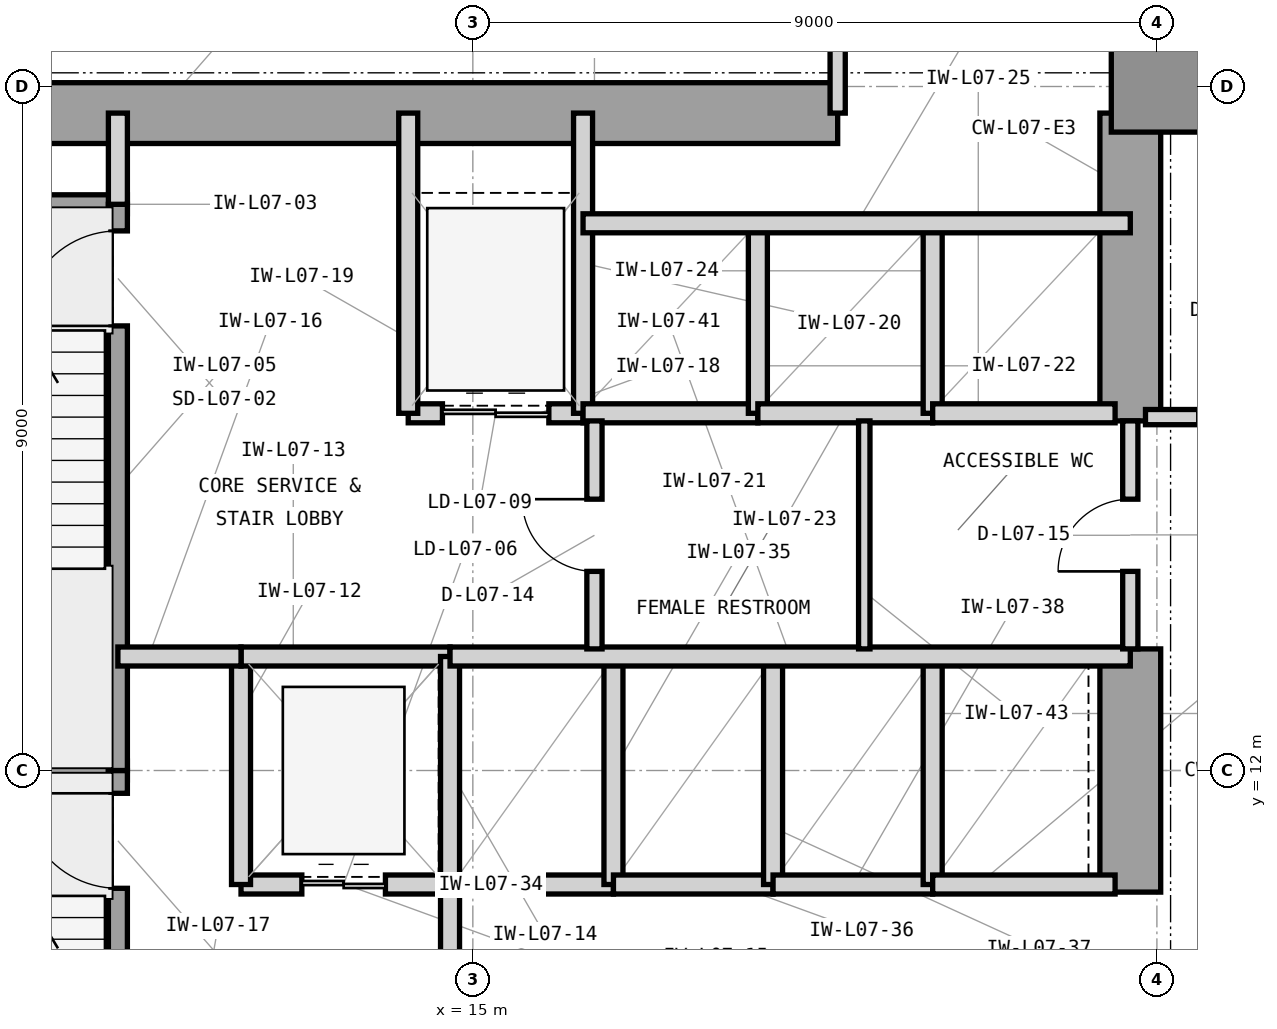
"""IFC4 building model, lengths in metres.
Left out: names, types, materials, properties, quantities, classifications, styles, units other than length and angle.
Written with IfcOpenShell. Run it as: python <this file> out.ifc"""

import sys

from ifc_helpers import new_model, si_unit, direction, frame, frame_2d, origin, origin_2d, place, context, subcontext, project, spatial, rectangle, extrude, element, fill, save


model = new_model("IFC4")
c1 = context("Model", 3, precision=1e-05, world=origin(), true_north=direction((0.0, 1.0)))
c2 = subcontext(c1, "Body", "Model", "MODEL_VIEW")
j1 = project(units=[si_unit("LENGTHUNIT", "METRE"), si_unit("PLANEANGLEUNIT", "RADIAN")], contexts=[c1])
p1 = place(None, origin())
s1 = spatial("IfcSite", under=j1, at=p1, CompositionType="ELEMENT")
p2 = place(p1, origin())
s2 = spatial("IfcBuilding", under=s1, at=p2, CompositionType="ELEMENT")
p3 = place(p2, frame((0.0, 0.0, 34.2)))
s3 = spatial("IfcBuildingStorey", under=s2, at=p3, CompositionType="ELEMENT", Elevation=34.2)
p4 = place(p3, frame((7.475, 20.65, 0.0), z_axis=(0.0, 0.0, 1.0), x_axis=(1.0, 0.0, 0.0)))
e1 = element("IfcWall", 1, at=p4, inside=s3, PredefinedType="SHEAR", context=c2, shape_type="SweptSolid", body=[
    extrude(rectangle(XDim=12.325, YDim=0.8, at=frame_2d((6.163, 0.0))), origin(), (0.0, 0.0, 1.0), 4.2),
])
p5 = place(p3, frame((23.65, 10.4, 0.0), z_axis=(0.0, 0.0, 1.0), x_axis=(0.0, 1.0, 0.0)))
e2 = element("IfcWall", 2, at=p5, inside=s3, PredefinedType="SHEAR", context=c2, shape_type="SweptSolid", body=[
    extrude(rectangle(XDim=3.2, YDim=0.8, at=frame_2d((1.6, 0.0))), origin(), (0.0, 0.0, 1.0), 4.2),
])
p6 = place(p3, frame((23.65, 16.6, 0.0), z_axis=(0.0, 0.0, 1.0), x_axis=(0.0, 1.0, 0.0)))
e3 = element("IfcWall", 3, at=p6, inside=s3, PredefinedType="SHEAR", context=c2, shape_type="SweptSolid", body=[
    extrude(rectangle(XDim=4.05, YDim=0.8, at=frame_2d((2.025, 0.0))), origin(), (0.0, 0.0, 1.0), 4.2),
])
p7 = place(p3, frame((24.0, 21.0, 0.0), z_axis=(0.0, 0.0, 1.0), x_axis=(1.0, 0.0, 0.0)))
e4 = element("IfcColumn", 4, at=p7, inside=s3, PredefinedType="COLUMN", context=c2, shape_type="SweptSolid", body=[
    extrude(rectangle(XDim=1.2, YDim=1.2, at=origin_2d()), origin(), (0.0, 0.0, 1.0), 4.2),
])
p8 = place(p3, frame((64.4, 20.79, 0.0), z_axis=(0.0, 0.0, 1.0), x_axis=(-1.0, 0.0, 0.0)))
e5 = element("IfcWall", 5, at=p8, inside=s3, PredefinedType="STANDARD", context=c2, shape_type="SweptSolid", body=[
    extrude(rectangle(XDim=40.4, YDim=0.42, at=frame_2d((20.2, 0.0))), origin(), (0.0, 0.0, 1.0), 3.98),
])
p9 = place(p8, frame((26.375, 0.0, 0.85)))
e6 = element("IfcOpeningElement", 6, at=p9, cuts=e5, PredefinedType="OPENING", context=c2, shape_type="SweptSolid", body=[
    extrude(rectangle(XDim=2.8, YDim=2.45, at=frame_2d((1.4, 1.225))), frame((0.0, 0.22, 0.0), z_axis=(0.0, -1.0, 0.0), x_axis=(1.0, 0.0, 0.0)), (0.0, 0.0, 1.0), 0.44),
])
p10 = place(p8, frame((38.222, 0.0, 0.85)))
e7 = element("IfcOpeningElement", 7, at=p10, cuts=e5, PredefinedType="OPENING", context=c2, shape_type="SweptSolid", body=[
    extrude(rectangle(XDim=1.2, YDim=2.45, at=frame_2d((0.6, 1.225))), frame((0.0, 0.22, 0.0), z_axis=(0.0, -1.0, 0.0), x_axis=(1.0, 0.0, 0.0)), (0.0, 0.0, 1.0), 0.44),
])
p11 = place(p8, frame((32.536, 0.0, 0.85)))
e8 = element("IfcOpeningElement", 8, at=p11, cuts=e5, PredefinedType="OPENING", context=c2, shape_type="SweptSolid", body=[
    extrude(rectangle(XDim=2.8, YDim=2.45, at=frame_2d((1.4, 1.225))), frame((0.0, 0.22, 0.0), z_axis=(0.0, -1.0, 0.0), x_axis=(1.0, 0.0, 0.0)), (0.0, 0.0, 1.0), 0.44),
])
p12 = place(p8, frame((17.386, 0.0, 0.85)))
e9 = element("IfcOpeningElement", 9, at=p12, cuts=e5, PredefinedType="OPENING", context=c2, shape_type="SweptSolid", body=[
    extrude(rectangle(XDim=2.8, YDim=2.45, at=frame_2d((1.4, 1.225))), frame((0.0, 0.22, 0.0), z_axis=(0.0, -1.0, 0.0), x_axis=(1.0, 0.0, 0.0)), (0.0, 0.0, 1.0), 0.44),
])
p13 = place(p8, frame((8.436, 0.0, 0.85)))
e10 = element("IfcOpeningElement", 10, at=p13, cuts=e5, PredefinedType="OPENING", context=c2, shape_type="SweptSolid", body=[
    extrude(rectangle(XDim=1.2, YDim=2.45, at=frame_2d((0.6, 1.225))), frame((0.0, 0.22, 0.0), z_axis=(0.0, -1.0, 0.0), x_axis=(1.0, 0.0, 0.0)), (0.0, 0.0, 1.0), 0.44),
])
p14 = place(p3, frame((23.79, 21.0, 0.0), z_axis=(0.0, 0.0, 1.0), x_axis=(0.0, 1.0, 0.0)))
e11 = element("IfcWall", 11, at=p14, inside=s3, PredefinedType="STANDARD", context=c2, shape_type="SweptSolid", body=[
    extrude(rectangle(XDim=28.4, YDim=0.42, at=frame_2d((14.2, 0.0))), origin(), (0.0, 0.0, 1.0), 3.98),
])
p15 = place(p14, frame((10.433, 0.0, 0.85)))
e12 = element("IfcOpeningElement", 12, at=p15, cuts=e11, PredefinedType="OPENING", context=c2, shape_type="SweptSolid", body=[
    extrude(rectangle(XDim=2.8, YDim=2.45, at=frame_2d((1.4, 1.225))), frame((0.0, 0.22, 0.0), z_axis=(0.0, -1.0, 0.0), x_axis=(1.0, 0.0, 0.0)), (0.0, 0.0, 1.0), 0.44),
])
p16 = place(p14, frame((21.966, 0.0, 0.85)))
e13 = element("IfcOpeningElement", 13, at=p16, cuts=e11, PredefinedType="OPENING", context=c2, shape_type="SweptSolid", body=[
    extrude(rectangle(XDim=1.2, YDim=2.45, at=frame_2d((0.6, 1.225))), frame((0.0, 0.22, 0.0), z_axis=(0.0, -1.0, 0.0), x_axis=(1.0, 0.0, 0.0)), (0.0, 0.0, 1.0), 0.44),
])
p17 = place(p3, frame((6.35, 12.0, 0.0), z_axis=(0.0, 0.0, 1.0), x_axis=(1.0, 0.0, 0.0)))
e14 = element("IfcWall", 14, at=p17, inside=s3, PredefinedType="SHEAR", context=c2, shape_type="SweptSolid", body=[
    extrude(rectangle(XDim=4.105, YDim=0.25, at=frame_2d((2.052, 0.0))), origin(), (0.0, 0.0, 1.0), 4.2),
])
p18 = place(p3, frame((7.7, 19.45, 0.0), z_axis=(0.0, 0.0, 1.0), x_axis=(1.0, 0.0, 0.0)))
e15 = element("IfcWall", 15, at=p18, inside=s3, PredefinedType="SHEAR", context=c2, shape_type="SweptSolid", body=[
    extrude(rectangle(XDim=2.755, YDim=0.25, at=frame_2d((1.377, 0.0))), origin(), (0.0, 0.0, 1.0), 4.2),
])
p19 = place(p3, frame((10.33, 4.55, 0.0), z_axis=(0.0, 0.0, 1.0), x_axis=(0.0, 1.0, 0.0)))
e16 = element("IfcWall", 16, at=p19, inside=s3, PredefinedType="SHEAR", context=c2, shape_type="SweptSolid", body=[
    extrude(rectangle(XDim=7.45, YDim=0.25, at=frame_2d((3.725, 0.0))), origin(), (0.0, 0.0, 1.0), 4.2),
])
p20 = place(p19, frame((5.9, 0.0, 0.0)))
e17 = element("IfcOpeningElement", 17, at=p20, cuts=e16, PredefinedType="OPENING", context=c2, shape_type="SweptSolid", body=[
    extrude(rectangle(XDim=1.25, YDim=2.2, at=frame_2d((0.625, 1.1))), frame((0.0, 0.135, 0.0), z_axis=(0.0, -1.0, 0.0), x_axis=(1.0, 0.0, 0.0)), (0.0, 0.0, 1.0), 0.27),
])
p21 = place(p3, frame((10.33, 12.0, 0.0), z_axis=(0.0, 0.0, 1.0), x_axis=(0.0, 1.0, 0.0)))
e18 = element("IfcWall", 18, at=p21, inside=s3, PredefinedType="SHEAR", context=c2, shape_type="SweptSolid", body=[
    extrude(rectangle(XDim=7.45, YDim=0.25, at=frame_2d((3.725, 0.0))), origin(), (0.0, 0.0, 1.0), 4.2),
])
p22 = place(p21, frame((5.85, 0.0, 0.0)))
e19 = element("IfcOpeningElement", 19, at=p22, cuts=e18, PredefinedType="OPENING", context=c2, shape_type="SweptSolid", body=[
    extrude(rectangle(XDim=1.25, YDim=2.2, at=frame_2d((0.625, 1.1))), frame((0.0, 0.135, 0.0), z_axis=(0.0, -1.0, 0.0), x_axis=(1.0, 0.0, 0.0)), (0.0, 0.0, 1.0), 0.27),
])
p23 = place(p3, frame((10.33, 19.45, 0.0), z_axis=(0.0, 0.0, 1.0), x_axis=(0.0, 1.0, 0.0)))
e20 = element("IfcWall", 20, at=p23, inside=s3, PredefinedType="PARTITIONING", context=c2, shape_type="SweptSolid", body=[
    extrude(rectangle(XDim=1.2, YDim=0.25, at=frame_2d((0.6, 0.0))), origin(), (0.0, 0.0, 1.0), 3.114),
])
p24 = place(p3, frame((11.95, 10.5, 0.0), z_axis=(0.0, 0.0, 1.0), x_axis=(1.0, 0.0, 0.0)))
e21 = element("IfcWall", 21, at=p24, inside=s3, PredefinedType="PARTITIONING", context=c2, shape_type="SweptSolid", body=[
    extrude(rectangle(XDim=2.75, YDim=0.25, at=frame_2d((1.375, 0.0))), origin(), (0.0, 0.0, 1.0), 3.426),
])
p25 = place(p24, frame((0.8, 0.0, 0.0)))
e22 = element("IfcOpeningElement", 22, at=p25, cuts=e21, PredefinedType="OPENING", context=c2, shape_type="SweptSolid", body=[
    extrude(rectangle(XDim=1.1, YDim=2.25, at=frame_2d((0.55, 1.125))), frame((0.0, 0.135, 0.0), z_axis=(0.0, -1.0, 0.0), x_axis=(1.0, 0.0, 0.0)), (0.0, 0.0, 1.0), 0.27),
])
p26 = place(p3, frame((11.95, 10.5, 0.0), z_axis=(0.0, 0.0, 1.0), x_axis=(0.0, 1.0, 0.0)))
e23 = element("IfcWall", 23, at=p26, inside=s3, PredefinedType="PARTITIONING", context=c2, shape_type="SweptSolid", body=[
    extrude(rectangle(XDim=3.0, YDim=0.25, at=frame_2d((1.5, 0.0))), origin(), (0.0, 0.0, 1.0), 3.97),
])
p27 = place(p3, frame((11.95, 13.5, 0.0), z_axis=(0.0, 0.0, 1.0), x_axis=(1.0, 0.0, 0.0)))
e24 = element("IfcWall", 24, at=p27, inside=s3, PredefinedType="PARTITIONING", context=c2, shape_type="SweptSolid", body=[
    extrude(rectangle(XDim=2.75, YDim=0.25, at=frame_2d((1.375, 0.0))), origin(), (0.0, 0.0, 1.0), 3.426),
])
p28 = place(p3, frame((14.7, 10.5, 0.0), z_axis=(0.0, 0.0, 1.0), x_axis=(0.0, 1.0, 0.0)))
e25 = element("IfcWall", 25, at=p28, inside=s3, PredefinedType="PARTITIONING", context=c2, shape_type="SweptSolid", body=[
    extrude(rectangle(XDim=3.0, YDim=0.25, at=frame_2d((1.5, 0.0))), origin(), (0.0, 0.0, 1.0), 3.97),
])
p29 = place(p3, frame((14.7, 6.7, 0.0), z_axis=(0.0, 0.0, 1.0), x_axis=(0.0, 1.0, 0.0)))
e26 = element("IfcWall", 26, at=p29, inside=s3, PredefinedType="PARTITIONING", context=c2, shape_type="SweptSolid", body=[
    extrude(rectangle(XDim=3.8, YDim=0.25, at=frame_2d((1.9, 0.0))), origin(), (0.0, 0.0, 1.0), 3.97),
])
p30 = place(p29, frame((1.3, 0.0, 0.0)))
e27 = element("IfcOpeningElement", 27, at=p30, cuts=e26, PredefinedType="OPENING", context=c2, shape_type="SweptSolid", body=[
    extrude(rectangle(XDim=1.2, YDim=2.2, at=frame_2d((0.6, 1.1))), frame((0.0, 0.135, 0.0), z_axis=(0.0, -1.0, 0.0), x_axis=(1.0, 0.0, 0.0)), (0.0, 0.0, 1.0), 0.27),
])
p31 = place(p3, frame((10.33, 13.5, 0.0), z_axis=(0.0, 0.0, 1.0), x_axis=(1.0, 0.0, 0.0)))
e28 = element("IfcWall", 28, at=p31, inside=s3, PredefinedType="PARTITIONING", context=c2, shape_type="SweptSolid", body=[
    extrude(rectangle(XDim=1.62, YDim=0.25, at=frame_2d((0.81, 0.0))), origin(), (0.0, 0.0, 1.0), 3.426),
])
p32 = place(p3, frame((14.15, 16.7, 0.0), z_axis=(0.0, 0.0, 1.0), x_axis=(1.0, 0.0, 0.0)))
e29 = element("IfcWall", 29, at=p32, inside=s3, PredefinedType="PARTITIONING", context=c2, shape_type="SweptSolid", body=[
    extrude(rectangle(XDim=2.3, YDim=0.25, at=frame_2d((1.15, 0.0))), origin(), (0.0, 0.0, 1.0), 3.426),
])
p33 = place(p32, frame((0.45, 0.0, 0.0)))
e30 = element("IfcOpeningElement", 30, at=p33, cuts=e29, PredefinedType="OPENING", context=c2, shape_type="SweptSolid", body=[
    extrude(rectangle(XDim=1.4, YDim=2.35, at=frame_2d((0.7, 1.175))), frame((0.0, 0.135, 0.0), z_axis=(0.0, -1.0, 0.0), x_axis=(1.0, 0.0, 0.0)), (0.0, 0.0, 1.0), 0.27),
])
for number, where, z_axis, x_axis in (
    (31, (14.15, 16.7, 0.0), (0.0, 0.0, 1.0), (0.0, 1.0, 0.0)),
    (32, (16.45, 16.7, 0.0), (0.0, 0.0, 1.0), (0.0, 1.0, 0.0)),
):
    element("IfcWall", number, at=place(p3, frame(where, z_axis=z_axis, x_axis=x_axis)), inside=s3, PredefinedType="PARTITIONING", context=c2, shape_type="SweptSolid", body=[
        extrude(rectangle(XDim=3.95, YDim=0.25, at=frame_2d((1.975, 0.0))), origin(), (0.0, 0.0, 1.0), 3.97),
    ])
p34 = place(p3, frame((16.45, 16.7, 0.0), z_axis=(0.0, 0.0, 1.0), x_axis=(1.0, 0.0, 0.0)))
e33 = element("IfcWall", 33, at=p34, inside=s3, PredefinedType="PARTITIONING", context=c2, shape_type="SweptSolid", body=[
    extrude(rectangle(XDim=2.3, YDim=0.25, at=frame_2d((1.15, 0.0))), origin(), (0.0, 0.0, 1.0), 3.426),
])
p35 = place(p3, frame((18.75, 16.7, 0.0), z_axis=(0.0, 0.0, 1.0), x_axis=(0.0, 1.0, 0.0)))
e34 = element("IfcWall", 34, at=p35, inside=s3, PredefinedType="PARTITIONING", context=c2, shape_type="SweptSolid", body=[
    extrude(rectangle(XDim=2.5, YDim=0.25, at=frame_2d((1.25, 0.0))), origin(), (0.0, 0.0, 1.0), 3.97),
])
p36 = place(p3, frame((18.75, 16.7, 0.0), z_axis=(0.0, 0.0, 1.0), x_axis=(1.0, 0.0, 0.0)))
e35 = element("IfcWall", 35, at=p36, inside=s3, PredefinedType="PARTITIONING", context=c2, shape_type="SweptSolid", body=[
    extrude(rectangle(XDim=2.3, YDim=0.25, at=frame_2d((1.15, 0.0))), origin(), (0.0, 0.0, 1.0), 3.426),
])
p37 = place(p3, frame((21.05, 16.7, 0.0), z_axis=(0.0, 0.0, 1.0), x_axis=(0.0, 1.0, 0.0)))
e36 = element("IfcWall", 36, at=p37, inside=s3, PredefinedType="PARTITIONING", context=c2, shape_type="SweptSolid", body=[
    extrude(rectangle(XDim=2.5, YDim=0.25, at=frame_2d((1.25, 0.0))), origin(), (0.0, 0.0, 1.0), 3.97),
])
p38 = place(p3, frame((21.05, 16.7, 0.0), z_axis=(0.0, 0.0, 1.0), x_axis=(1.0, 0.0, 0.0)))
e37 = element("IfcWall", 37, at=p38, inside=s3, PredefinedType="PARTITIONING", context=c2, shape_type="SweptSolid", body=[
    extrude(rectangle(XDim=2.4, YDim=0.25, at=frame_2d((1.2, 0.0))), origin(), (0.0, 0.0, 1.0), 3.426),
])
p39 = place(p3, frame((16.45, 19.2, 0.0), z_axis=(0.0, 0.0, 1.0), x_axis=(1.0, 0.0, 0.0)))
e38 = element("IfcWall", 38, at=p39, inside=s3, PredefinedType="PARTITIONING", context=c2, shape_type="SweptSolid", body=[
    extrude(rectangle(XDim=7.2, YDim=0.25, at=frame_2d((3.6, 0.0))), origin(), (0.0, 0.0, 1.0), 3.97),
])
p40 = place(p3, frame((14.7, 10.5, 0.0), z_axis=(0.0, 0.0, 1.0), x_axis=(1.0, 0.0, 0.0)))
e39 = element("IfcWall", 39, at=p40, inside=s3, PredefinedType="PARTITIONING", context=c2, shape_type="SweptSolid", body=[
    extrude(rectangle(XDim=2.15, YDim=0.25, at=frame_2d((1.075, 0.0))), origin(), (0.0, 0.0, 1.0), 3.426),
])
p41 = place(p3, frame((16.85, 10.5, 0.0), z_axis=(0.0, 0.0, 1.0), x_axis=(0.0, 1.0, 0.0)))
e40 = element("IfcWall", 40, at=p41, inside=s3, PredefinedType="PARTITIONING", context=c2, shape_type="SweptSolid", body=[
    extrude(rectangle(XDim=3.0, YDim=0.25, at=frame_2d((1.5, 0.0))), origin(), (0.0, 0.0, 1.0), 3.97),
])
p42 = place(p3, frame((16.85, 10.5, 0.0), z_axis=(0.0, 0.0, 1.0), x_axis=(1.0, 0.0, 0.0)))
e41 = element("IfcWall", 41, at=p42, inside=s3, PredefinedType="PARTITIONING", context=c2, shape_type="SweptSolid", body=[
    extrude(rectangle(XDim=2.1, YDim=0.25, at=frame_2d((1.05, 0.0))), origin(), (0.0, 0.0, 1.0), 3.426),
])
p43 = place(p3, frame((18.95, 10.5, 0.0), z_axis=(0.0, 0.0, 1.0), x_axis=(0.0, 1.0, 0.0)))
e42 = element("IfcWall", 42, at=p43, inside=s3, PredefinedType="PARTITIONING", context=c2, shape_type="SweptSolid", body=[
    extrude(rectangle(XDim=3.0, YDim=0.25, at=frame_2d((1.5, 0.0))), origin(), (0.0, 0.0, 1.0), 3.97),
])
p44 = place(p3, frame((18.95, 10.5, 0.0), z_axis=(0.0, 0.0, 1.0), x_axis=(1.0, 0.0, 0.0)))
e43 = element("IfcWall", 43, at=p44, inside=s3, PredefinedType="PARTITIONING", context=c2, shape_type="SweptSolid", body=[
    extrude(rectangle(XDim=2.1, YDim=0.25, at=frame_2d((1.05, 0.0))), origin(), (0.0, 0.0, 1.0), 3.426),
])
p45 = place(p3, frame((21.05, 10.5, 0.0), z_axis=(0.0, 0.0, 1.0), x_axis=(0.0, 1.0, 0.0)))
e44 = element("IfcWall", 44, at=p45, inside=s3, PredefinedType="PARTITIONING", context=c2, shape_type="SweptSolid", body=[
    extrude(rectangle(XDim=3.0, YDim=0.25, at=frame_2d((1.5, 0.0))), origin(), (0.0, 0.0, 1.0), 3.97),
])
p46 = place(p3, frame((21.05, 10.5, 0.0), z_axis=(0.0, 0.0, 1.0), x_axis=(1.0, 0.0, 0.0)))
e45 = element("IfcWall", 45, at=p46, inside=s3, PredefinedType="PARTITIONING", context=c2, shape_type="SweptSolid", body=[
    extrude(rectangle(XDim=2.4, YDim=0.25, at=frame_2d((1.2, 0.0))), origin(), (0.0, 0.0, 1.0), 3.426),
])
p47 = place(p3, frame((14.7, 13.5, 0.0), z_axis=(0.0, 0.0, 1.0), x_axis=(1.0, 0.0, 0.0)))
e46 = element("IfcWall", 46, at=p47, inside=s3, PredefinedType="PARTITIONING", context=c2, shape_type="SweptSolid", body=[
    extrude(rectangle(XDim=8.95, YDim=0.25, at=frame_2d((4.475, 0.0))), origin(), (0.0, 0.0, 1.0), 3.426),
])
p48 = place(p3, frame((16.6, 13.6, 0.0), z_axis=(0.0, 0.0, 1.0), x_axis=(0.0, 1.0, 0.0)))
e47 = element("IfcWall", 47, at=p48, inside=s3, PredefinedType="PARTITIONING", context=c2, shape_type="SweptSolid", body=[
    extrude(rectangle(XDim=3.0, YDim=0.2, at=frame_2d((1.5, 0.0))), origin(), (0.0, 0.0, 1.0), 3.97),
])
p49 = place(p48, frame((1.02, 0.0, 0.0)))
e48 = element("IfcOpeningElement", 48, at=p49, cuts=e47, PredefinedType="OPENING", context=c2, shape_type="SweptSolid", body=[
    extrude(rectangle(XDim=0.95, YDim=2.1, at=frame_2d((0.475, 1.05))), frame((0.0, 0.11, 0.0), z_axis=(0.0, -1.0, 0.0), x_axis=(1.0, 0.0, 0.0)), (0.0, 0.0, 1.0), 0.22),
])
p50 = place(p3, frame((20.15, 13.6, 0.0), z_axis=(0.0, 0.0, 1.0), x_axis=(0.0, 1.0, 0.0)))
e49 = element("IfcWall", 49, at=p50, inside=s3, PredefinedType="PARTITIONING", context=c2, shape_type="SweptSolid", body=[
    extrude(rectangle(XDim=3.0, YDim=0.15, at=frame_2d((1.5, 0.0))), origin(), (0.0, 0.0, 1.0), 3.97),
])
p51 = place(p3, frame((23.65, 13.6, 0.0), z_axis=(0.0, 0.0, 1.0), x_axis=(0.0, 1.0, 0.0)))
e50 = element("IfcWall", 50, at=p51, inside=s3, PredefinedType="PARTITIONING", context=c2, shape_type="SweptSolid", body=[
    extrude(rectangle(XDim=3.0, YDim=0.2, at=frame_2d((1.5, 0.0))), origin(), (0.0, 0.0, 1.0), 3.97),
])
p52 = place(p51, frame((1.02, 0.0, 0.0)))
e51 = element("IfcOpeningElement", 51, at=p52, cuts=e50, PredefinedType="OPENING", context=c2, shape_type="SweptSolid", body=[
    extrude(rectangle(XDim=0.95, YDim=2.1, at=frame_2d((0.475, 1.05))), frame((0.0, 0.11, 0.0), z_axis=(0.0, -1.0, 0.0), x_axis=(1.0, 0.0, 0.0)), (0.0, 0.0, 1.0), 0.22),
])
p53 = place(p3, frame((23.85, 16.65, 0.0), z_axis=(0.0, 0.0, 1.0), x_axis=(1.0, 0.0, 0.0)))
e52 = element("IfcWall", 52, at=p53, inside=s3, PredefinedType="PARTITIONING", context=c2, shape_type="SweptSolid", body=[
    extrude(rectangle(XDim=2.85, YDim=0.2, at=frame_2d((1.425, 0.0))), origin(), (0.0, 0.0, 1.0), 3.97),
])
p54 = place(p53, frame((0.7, 0.0, 0.0)))
e53 = element("IfcOpeningElement", 53, at=p54, cuts=e52, PredefinedType="OPENING", context=c2, shape_type="SweptSolid", body=[
    extrude(rectangle(XDim=1.0, YDim=2.15, at=frame_2d((0.5, 1.075))), frame((0.0, 0.11, 0.0), z_axis=(0.0, -1.0, 0.0), x_axis=(1.0, 0.0, 0.0)), (0.0, 0.0, 1.0), 0.22),
])
p55 = place(p3, frame((19.8, 20.65, 0.0), z_axis=(0.0, 0.0, 1.0), x_axis=(0.0, 1.0, 0.0)))
e54 = element("IfcWall", 54, at=p55, inside=s3, PredefinedType="PARTITIONING", context=c2, shape_type="SweptSolid", body=[
    extrude(rectangle(XDim=6.15, YDim=0.2, at=frame_2d((3.075, 0.0))), origin(), (0.0, 0.0, 1.0), 3.97),
])
p56 = place(p20, origin())
e55 = element("IfcDoor", 55, at=p56, inside=s3, OperationType="SINGLE_SWING_RIGHT", PredefinedType="DOOR", context=c2, shape_type="SweptSolid", body=[
    extrude(rectangle(XDim=1.25, YDim=2.2, at=frame_2d((0.625, 1.1))), frame((0.0, 0.025, 0.0), z_axis=(0.0, -1.0, 0.0), x_axis=(1.0, 0.0, 0.0)), (0.0, 0.0, 1.0), 0.05),
])
fill(e17, e55)
p57 = place(p22, origin())
e56 = element("IfcDoor", 56, at=p57, inside=s3, OperationType="SINGLE_SWING_LEFT", PredefinedType="DOOR", context=c2, shape_type="SweptSolid", body=[
    extrude(rectangle(XDim=1.25, YDim=2.2, at=frame_2d((0.625, 1.1))), frame((0.0, 0.025, 0.0), z_axis=(0.0, -1.0, 0.0), x_axis=(1.0, 0.0, 0.0)), (0.0, 0.0, 1.0), 0.05),
])
fill(e19, e56)
p58 = place(p25, origin())
e57 = element("IfcDoor", 57, at=p58, inside=s3, OperationType="DOUBLE_DOOR_SLIDING", PredefinedType="DOOR", context=c2, shape_type="SweptSolid", body=[
    extrude(rectangle(XDim=1.1, YDim=2.25, at=frame_2d((0.55, 1.125))), frame((0.0, 0.025, 0.0), z_axis=(0.0, -1.0, 0.0), x_axis=(1.0, 0.0, 0.0)), (0.0, 0.0, 1.0), 0.05),
])
fill(e22, e57)
p59 = place(p33, origin())
e58 = element("IfcDoor", 58, at=p59, inside=s3, OperationType="DOUBLE_DOOR_SLIDING", PredefinedType="DOOR", context=c2, shape_type="SweptSolid", body=[
    extrude(rectangle(XDim=1.4, YDim=2.35, at=frame_2d((0.7, 1.175))), frame((0.0, 0.025, 0.0), z_axis=(0.0, -1.0, 0.0), x_axis=(1.0, 0.0, 0.0)), (0.0, 0.0, 1.0), 0.05),
])
fill(e30, e58)
p60 = place(p49, origin())
e59 = element("IfcDoor", 59, at=p60, inside=s3, OperationType="SINGLE_SWING_RIGHT", PredefinedType="DOOR", context=c2, shape_type="SweptSolid", body=[
    extrude(rectangle(XDim=0.95, YDim=2.1, at=frame_2d((0.475, 1.05))), frame((0.0, 0.025, 0.0), z_axis=(0.0, -1.0, 0.0), x_axis=(1.0, 0.0, 0.0)), (0.0, 0.0, 1.0), 0.05),
])
fill(e48, e59)
p61 = place(p52, origin())
e60 = element("IfcDoor", 60, at=p61, inside=s3, OperationType="SINGLE_SWING_LEFT", PredefinedType="DOOR", context=c2, shape_type="SweptSolid", body=[
    extrude(rectangle(XDim=0.95, YDim=2.1, at=frame_2d((0.475, 1.05))), frame((0.0, 0.025, 0.0), z_axis=(0.0, -1.0, 0.0), x_axis=(1.0, 0.0, 0.0)), (0.0, 0.0, 1.0), 0.05),
])
fill(e51, e60)
save(model, sys.argv[1])
